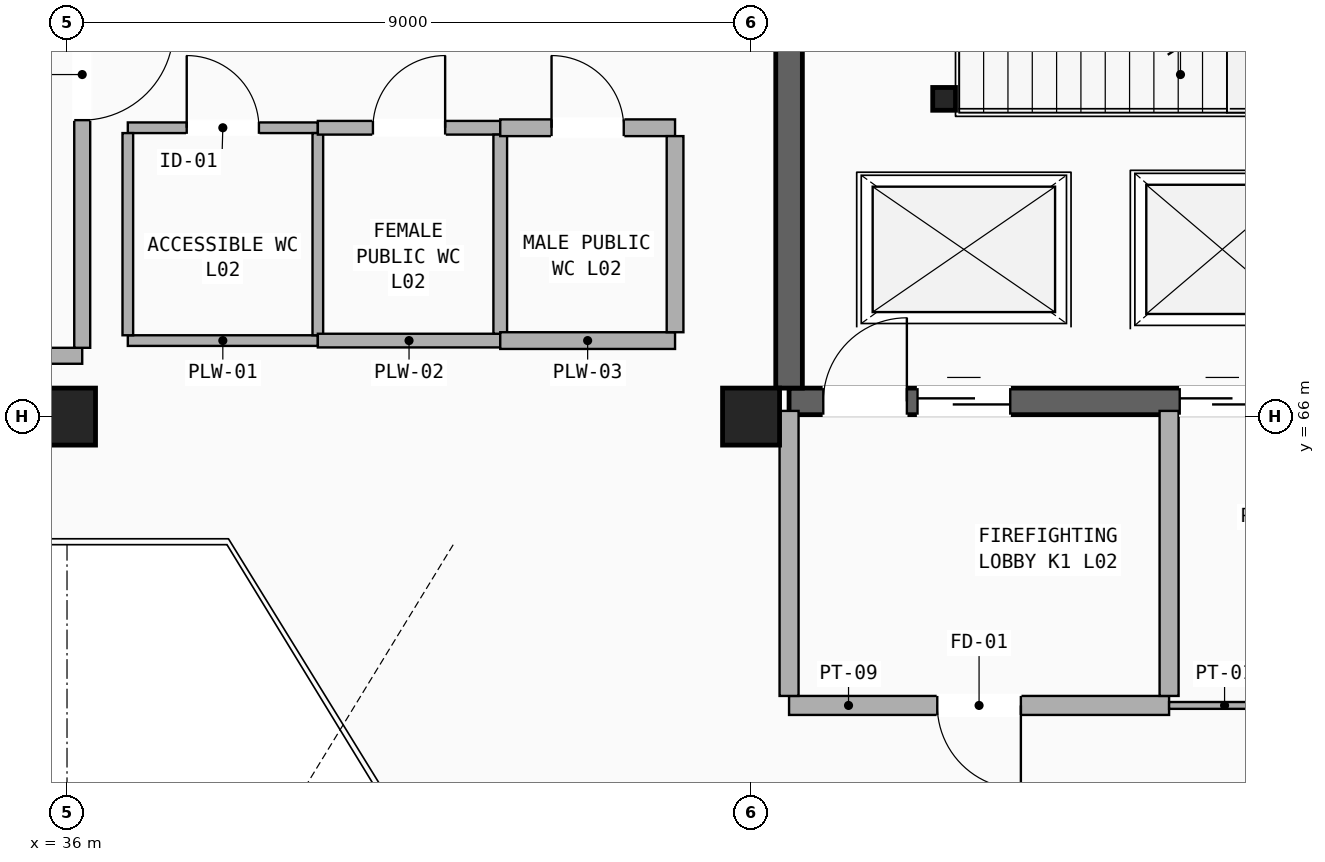
"""IFC4 building model, lengths in metres.
Left out: names, types, materials, properties, quantities, classifications, styles, units other than length and angle.
Written with IfcOpenShell. Run it as: python <this file> out.ifc"""

import sys

from ifc_helpers import new_model, si_unit, direction, frame, frame_2d, origin, origin_2d, place, context, subcontext, project, spatial, rectangle, hollow_rectangle, extrude, element, fill, save


model = new_model("IFC4")
c1 = context("Model", 3, precision=1e-05, world=origin(), true_north=direction((0.0, 1.0)))
c2 = subcontext(c1, "Body", "Model", "MODEL_VIEW")
j1 = project(units=[si_unit("LENGTHUNIT", "METRE"), si_unit("PLANEANGLEUNIT", "RADIAN")], contexts=[c1])
p1 = place(None, origin())
s1 = spatial("IfcSite", under=j1, at=p1, CompositionType="ELEMENT")
p2 = place(p1, origin())
s2 = spatial("IfcBuilding", under=s1, at=p2, CompositionType="ELEMENT")
p3 = place(p2, frame((0.0, 0.0, 9.52)))
s3 = spatial("IfcBuildingStorey", under=s2, at=p3, CompositionType="ELEMENT", Elevation=9.52)
for number, where, z_axis, x_axis in (
    (1, (36.0, 66.0, 0.0), (0.0, 0.0, 1.0), (1.0, 0.0, 0.0)),
    (2, (45.0, 66.0, 0.0), (0.0, 0.0, 1.0), (1.0, 0.0, 0.0)),
):
    element("IfcColumn", number, at=place(p3, frame(where, z_axis=z_axis, x_axis=x_axis)), inside=s3, PredefinedType="COLUMN", context=c2, shape_type="SweptSolid", body=[
        extrude(rectangle(XDim=0.75, YDim=0.75, at=origin_2d()), origin(), (0.0, 0.0, 1.0), 4.08),
    ])
p4 = place(p3, frame((45.5, 66.2, 0.0), z_axis=(0.0, 0.0, 1.0), x_axis=(1.0, 0.0, 0.0)))
e3 = element("IfcWall", 3, at=p4, inside=s3, PredefinedType="SHEAR", context=c2, shape_type="SweptSolid", body=[
    extrude(rectangle(XDim=10.3, YDim=0.35, at=frame_2d((5.15, 0.0))), origin(), (0.0, 0.0, 1.0), 4.08),
])
p5 = place(p4, frame((0.45, 0.0, 0.0)))
e4 = element("IfcOpeningElement", 4, at=p5, cuts=e3, PredefinedType="OPENING", context=c2, shape_type="SweptSolid", body=[
    extrude(rectangle(XDim=1.1, YDim=2.2, at=frame_2d((0.55, 1.1))), frame((0.0, 0.185, 0.0), z_axis=(0.0, -1.0, 0.0), x_axis=(1.0, 0.0, 0.0)), (0.0, 0.0, 1.0), 0.37),
])
p6 = place(p4, frame((1.69, 0.0, 0.0)))
e5 = element("IfcOpeningElement", 5, at=p6, cuts=e3, PredefinedType="OPENING", context=c2, shape_type="SweptSolid", body=[
    extrude(rectangle(XDim=1.22, YDim=2.2, at=frame_2d((0.61, 1.1))), frame((0.0, 0.185, 0.0), z_axis=(0.0, -1.0, 0.0), x_axis=(1.0, 0.0, 0.0)), (0.0, 0.0, 1.0), 0.37),
])
p7 = place(p4, frame((5.14, 0.0, 0.0)))
e6 = element("IfcOpeningElement", 6, at=p7, cuts=e3, PredefinedType="OPENING", context=c2, shape_type="SweptSolid", body=[
    extrude(rectangle(XDim=1.12, YDim=2.16, at=frame_2d((0.56, 1.08))), frame((0.0, 0.185, 0.0), z_axis=(0.0, -1.0, 0.0), x_axis=(1.0, 0.0, 0.0)), (0.0, 0.0, 1.0), 0.37),
])
p8 = place(p3, frame((45.5, 66.375, 0.0), z_axis=(0.0, 0.0, 1.0), x_axis=(0.0, 1.0, 0.0)))
e7 = element("IfcWall", 7, at=p8, inside=s3, PredefinedType="SHEAR", context=c2, shape_type="SweptSolid", body=[
    extrude(rectangle(XDim=8.25, YDim=0.35, at=frame_2d((4.125, 0.0))), origin(), (0.0, 0.0, 1.0), 4.08),
])
p9 = place(p3, frame((47.54, 70.18, 0.0), z_axis=(0.0, 0.0, 1.0), x_axis=(1.0, 0.0, 0.0)))
e8 = element("IfcColumn", 8, at=p9, inside=s3, PredefinedType="COLUMN", context=c2, shape_type="SweptSolid", body=[
    extrude(hollow_rectangle(XDim=0.3, YDim=0.3, WallThickness=0.016, InnerFilletRadius=0.016, OuterFilletRadius=0.032, at=origin_2d()), origin(), (0.0, 0.0, 1.0), 4.08),
])
p10 = place(p3, frame((45.5, 62.2, 0.0), z_axis=(0.0, 0.0, 1.0), x_axis=(1.0, 0.0, 0.0)))
e9 = element("IfcWall", 9, at=p10, inside=s3, PredefinedType="PARTITIONING", context=c2, shape_type="SweptSolid", body=[
    extrude(rectangle(XDim=5.0, YDim=0.25, at=frame_2d((2.5, 0.0))), origin(), (0.0, 0.0, 1.0), 3.84),
])
p11 = place(p10, frame((1.95, 0.0, 0.0)))
e10 = element("IfcOpeningElement", 10, at=p11, cuts=e9, PredefinedType="OPENING", context=c2, shape_type="SweptSolid", body=[
    extrude(rectangle(XDim=1.1, YDim=2.2, at=frame_2d((0.55, 1.1))), frame((0.0, 0.135, 0.0), z_axis=(0.0, -1.0, 0.0), x_axis=(1.0, 0.0, 0.0)), (0.0, 0.0, 1.0), 0.27),
])
for number, where, z_axis, x_axis in (
    (11, (45.5, 62.325, 0.0), (0.0, 0.0, 1.0), (0.0, 1.0, 0.0)),
    (12, (50.5, 62.325, 0.0), (0.0, 0.0, 1.0), (0.0, 1.0, 0.0)),
):
    element("IfcWall", number, at=place(p3, frame(where, z_axis=z_axis, x_axis=x_axis)), inside=s3, PredefinedType="PARTITIONING", context=c2, shape_type="SweptSolid", body=[
        extrude(rectangle(XDim=3.75, YDim=0.25, at=frame_2d((1.875, 0.0))), origin(), (0.0, 0.0, 1.0), 2.82),
    ])
p12 = place(p3, frame((50.5, 62.2, 0.0), z_axis=(0.0, 0.0, 1.0), x_axis=(1.0, 0.0, 0.0)))
e13 = element("IfcWall", 13, at=p12, inside=s3, PredefinedType="PARTITIONING", context=c2, shape_type="SweptSolid", body=[
    extrude(rectangle(XDim=5.3, YDim=0.09, at=frame_2d((2.65, 0.0))), origin(), (0.0, 0.0, 1.0), 3.17),
])
p13 = place(p12, frame((1.95, 0.0, 0.0)))
e14 = element("IfcOpeningElement", 14, at=p13, cuts=e13, PredefinedType="OPENING", context=c2, shape_type="SweptSolid", body=[
    extrude(rectangle(XDim=1.4, YDim=2.2, at=frame_2d((0.7, 1.1))), frame((0.0, 0.055, 0.0), z_axis=(0.0, -1.0, 0.0), x_axis=(1.0, 0.0, 0.0)), (0.0, 0.0, 1.0), 0.11),
])
p14 = place(p3, frame((36.8, 67.0, 0.0), z_axis=(0.0, 0.0, 1.0), x_axis=(1.0, 0.0, 0.0)))
e15 = element("IfcWall", 15, at=p14, inside=s3, PredefinedType="PLUMBINGWALL", context=c2, shape_type="SweptSolid", body=[
    extrude(rectangle(XDim=2.5, YDim=0.14, at=frame_2d((1.25, 0.0))), origin(), (0.0, 0.0, 1.0), 3.84),
])
p15 = place(p3, frame((36.8, 69.8, 0.0), z_axis=(0.0, 0.0, 1.0), x_axis=(1.0, 0.0, 0.0)))
e16 = element("IfcWall", 16, at=p15, inside=s3, PredefinedType="PLUMBINGWALL", context=c2, shape_type="SweptSolid", body=[
    extrude(rectangle(XDim=2.5, YDim=0.14, at=frame_2d((1.25, 0.0))), origin(), (0.0, 0.0, 1.0), 3.84),
])
p16 = place(p15, frame((0.775, 0.0, 0.0)))
e17 = element("IfcOpeningElement", 17, at=p16, cuts=e16, PredefinedType="OPENING", context=c2, shape_type="SweptSolid", body=[
    extrude(rectangle(XDim=0.95, YDim=2.15, at=frame_2d((0.475, 1.075))), frame((0.0, 0.08, 0.0), z_axis=(0.0, -1.0, 0.0), x_axis=(1.0, 0.0, 0.0)), (0.0, 0.0, 1.0), 0.16),
])
for number, where, z_axis, x_axis in (
    (18, (36.8, 67.07, 0.0), (0.0, 0.0, 1.0), (0.0, 1.0, 0.0)),
    (19, (39.3, 67.07, 0.0), (0.0, 0.0, 1.0), (0.0, 1.0, 0.0)),
):
    element("IfcWall", number, at=place(p3, frame(where, z_axis=z_axis, x_axis=x_axis)), inside=s3, PredefinedType="PLUMBINGWALL", context=c2, shape_type="SweptSolid", body=[
        extrude(rectangle(XDim=2.66, YDim=0.14, at=frame_2d((1.33, 0.0))), origin(), (0.0, 0.0, 1.0), 3.84),
    ])
p17 = place(p3, frame((39.3, 67.0, 0.0), z_axis=(0.0, 0.0, 1.0), x_axis=(1.0, 0.0, 0.0)))
e20 = element("IfcWall", 20, at=p17, inside=s3, PredefinedType="PLUMBINGWALL", context=c2, shape_type="SweptSolid", body=[
    extrude(rectangle(XDim=2.4, YDim=0.18, at=frame_2d((1.2, 0.0))), origin(), (0.0, 0.0, 1.0), 3.84),
])
p18 = place(p3, frame((39.3, 69.8, 0.0), z_axis=(0.0, 0.0, 1.0), x_axis=(1.0, 0.0, 0.0)))
e21 = element("IfcWall", 21, at=p18, inside=s3, PredefinedType="PLUMBINGWALL", context=c2, shape_type="SweptSolid", body=[
    extrude(rectangle(XDim=2.4, YDim=0.18, at=frame_2d((1.2, 0.0))), origin(), (0.0, 0.0, 1.0), 3.84),
])
p19 = place(p18, frame((0.725, 0.0, 0.0)))
e22 = element("IfcOpeningElement", 22, at=p19, cuts=e21, PredefinedType="OPENING", context=c2, shape_type="SweptSolid", body=[
    extrude(rectangle(XDim=0.95, YDim=2.15, at=frame_2d((0.475, 1.075))), frame((0.0, 0.1, 0.0), z_axis=(0.0, -1.0, 0.0), x_axis=(1.0, 0.0, 0.0)), (0.0, 0.0, 1.0), 0.2),
])
p20 = place(p3, frame((41.7, 67.09, 0.0), z_axis=(0.0, 0.0, 1.0), x_axis=(0.0, 1.0, 0.0)))
e23 = element("IfcWall", 23, at=p20, inside=s3, PredefinedType="PLUMBINGWALL", context=c2, shape_type="SweptSolid", body=[
    extrude(rectangle(XDim=2.62, YDim=0.18, at=frame_2d((1.31, 0.0))), origin(), (0.0, 0.0, 1.0), 3.84),
])
p21 = place(p3, frame((41.7, 67.0, 0.0), z_axis=(0.0, 0.0, 1.0), x_axis=(1.0, 0.0, 0.0)))
e24 = element("IfcWall", 24, at=p21, inside=s3, PredefinedType="PLUMBINGWALL", context=c2, shape_type="SweptSolid", body=[
    extrude(rectangle(XDim=2.3, YDim=0.22, at=frame_2d((1.15, 0.0))), origin(), (0.0, 0.0, 1.0), 3.84),
])
p22 = place(p3, frame((41.7, 69.8, 0.0), z_axis=(0.0, 0.0, 1.0), x_axis=(1.0, 0.0, 0.0)))
e25 = element("IfcWall", 25, at=p22, inside=s3, PredefinedType="PLUMBINGWALL", context=c2, shape_type="SweptSolid", body=[
    extrude(rectangle(XDim=2.3, YDim=0.22, at=frame_2d((1.15, 0.0))), origin(), (0.0, 0.0, 1.0), 3.84),
])
p23 = place(p22, frame((0.675, 0.0, 0.0)))
e26 = element("IfcOpeningElement", 26, at=p23, cuts=e25, PredefinedType="OPENING", context=c2, shape_type="SweptSolid", body=[
    extrude(rectangle(XDim=0.95, YDim=2.15, at=frame_2d((0.475, 1.075))), frame((0.0, 0.12, 0.0), z_axis=(0.0, -1.0, 0.0), x_axis=(1.0, 0.0, 0.0)), (0.0, 0.0, 1.0), 0.24),
])
p24 = place(p3, frame((44.0, 67.11, 0.0), z_axis=(0.0, 0.0, 1.0), x_axis=(0.0, 1.0, 0.0)))
e27 = element("IfcWall", 27, at=p24, inside=s3, PredefinedType="PLUMBINGWALL", context=c2, shape_type="SweptSolid", body=[
    extrude(rectangle(XDim=2.58, YDim=0.22, at=frame_2d((1.29, 0.0))), origin(), (0.0, 0.0, 1.0), 3.84),
])
p25 = place(p3, frame((27.6, 66.8, 0.0), z_axis=(0.0, 0.0, 1.0), x_axis=(1.0, 0.0, 0.0)))
e28 = element("IfcWall", 28, at=p25, inside=s3, PredefinedType="PARTITIONING", context=c2, shape_type="SweptSolid", body=[
    extrude(rectangle(XDim=8.6, YDim=0.21, at=frame_2d((4.3, 0.0))), origin(), (0.0, 0.0, 1.0), 3.17),
])
p26 = place(p3, frame((36.2, 66.905, 0.0), z_axis=(0.0, 0.0, 1.0), x_axis=(0.0, 1.0, 0.0)))
e29 = element("IfcWall", 29, at=p26, inside=s3, PredefinedType="PARTITIONING", context=c2, shape_type="SweptSolid", body=[
    extrude(rectangle(XDim=7.19, YDim=0.21, at=frame_2d((3.595, 0.0))), origin(), (0.0, 0.0, 1.0), 3.17),
])
p27 = place(p26, frame((2.995, 0.0, 0.0)))
e30 = element("IfcOpeningElement", 30, at=p27, cuts=e29, PredefinedType="OPENING", context=c2, shape_type="SweptSolid", body=[
    extrude(rectangle(XDim=1.2, YDim=2.2, at=frame_2d((0.6, 1.1))), frame((0.0, 0.115, 0.0), z_axis=(0.0, -1.0, 0.0), x_axis=(1.0, 0.0, 0.0)), (0.0, 0.0, 1.0), 0.23),
])
p28 = place(p5, origin())
e31 = element("IfcDoor", 31, at=p28, inside=s3, OperationType="SINGLE_SWING_RIGHT", PredefinedType="DOOR", context=c2, shape_type="SweptSolid", body=[
    extrude(rectangle(XDim=1.1, YDim=2.2, at=frame_2d((0.55, 1.1))), frame((0.0, 0.025, 0.0), z_axis=(0.0, -1.0, 0.0), x_axis=(1.0, 0.0, 0.0)), (0.0, 0.0, 1.0), 0.05),
])
fill(e4, e31)
p29 = place(p6, origin())
e32 = element("IfcDoor", 32, at=p29, inside=s3, OperationType="SLIDING_TO_LEFT", PredefinedType="DOOR", context=c2, shape_type="SweptSolid", body=[
    extrude(rectangle(XDim=1.22, YDim=2.2, at=frame_2d((0.61, 1.1))), frame((0.0, 0.025, 0.0), z_axis=(0.0, -1.0, 0.0), x_axis=(1.0, 0.0, 0.0)), (0.0, 0.0, 1.0), 0.05),
])
fill(e5, e32)
p30 = place(p7, origin())
e33 = element("IfcDoor", 33, at=p30, inside=s3, OperationType="SLIDING_TO_LEFT", PredefinedType="DOOR", context=c2, shape_type="SweptSolid", body=[
    extrude(rectangle(XDim=1.12, YDim=2.16, at=frame_2d((0.56, 1.08))), frame((0.0, 0.025, 0.0), z_axis=(0.0, -1.0, 0.0), x_axis=(1.0, 0.0, 0.0)), (0.0, 0.0, 1.0), 0.05),
])
fill(e6, e33)
p31 = place(p11, frame((1.1, 0.0, 0.0), z_axis=(0.0, 0.0, 1.0), x_axis=(-1.0, 0.0, 0.0)))
e34 = element("IfcDoor", 34, at=p31, inside=s3, OperationType="SINGLE_SWING_LEFT", PredefinedType="DOOR", context=c2, shape_type="SweptSolid", body=[
    extrude(rectangle(XDim=1.1, YDim=2.2, at=frame_2d((0.55, 1.1))), frame((0.0, 0.025, 0.0), z_axis=(0.0, -1.0, 0.0), x_axis=(1.0, 0.0, 0.0)), (0.0, 0.0, 1.0), 0.05),
])
fill(e10, e34)
p32 = place(p16, origin())
e35 = element("IfcDoor", 35, at=p32, inside=s3, OperationType="SINGLE_SWING_LEFT", PredefinedType="DOOR", context=c2, shape_type="SweptSolid", body=[
    extrude(rectangle(XDim=0.95, YDim=2.15, at=frame_2d((0.475, 1.075))), frame((0.0, 0.025, 0.0), z_axis=(0.0, -1.0, 0.0), x_axis=(1.0, 0.0, 0.0)), (0.0, 0.0, 1.0), 0.05),
])
fill(e17, e35)
p33 = place(p19, origin())
e36 = element("IfcDoor", 36, at=p33, inside=s3, OperationType="SINGLE_SWING_RIGHT", PredefinedType="DOOR", context=c2, shape_type="SweptSolid", body=[
    extrude(rectangle(XDim=0.95, YDim=2.15, at=frame_2d((0.475, 1.075))), frame((0.0, 0.025, 0.0), z_axis=(0.0, -1.0, 0.0), x_axis=(1.0, 0.0, 0.0)), (0.0, 0.0, 1.0), 0.05),
])
fill(e22, e36)
p34 = place(p23, origin())
e37 = element("IfcDoor", 37, at=p34, inside=s3, OperationType="SINGLE_SWING_LEFT", PredefinedType="DOOR", context=c2, shape_type="SweptSolid", body=[
    extrude(rectangle(XDim=0.95, YDim=2.15, at=frame_2d((0.475, 1.075))), frame((0.0, 0.025, 0.0), z_axis=(0.0, -1.0, 0.0), x_axis=(1.0, 0.0, 0.0)), (0.0, 0.0, 1.0), 0.05),
])
fill(e26, e37)
p35 = place(p27, frame((1.2, 0.0, 0.0), z_axis=(0.0, 0.0, 1.0), x_axis=(-1.0, 0.0, 0.0)))
e38 = element("IfcDoor", 38, at=p35, inside=s3, OperationType="SINGLE_SWING_LEFT", PredefinedType="DOOR", context=c2, shape_type="SweptSolid", body=[
    extrude(rectangle(XDim=1.2, YDim=2.2, at=frame_2d((0.6, 1.1))), frame((0.0, 0.025, 0.0), z_axis=(0.0, -1.0, 0.0), x_axis=(1.0, 0.0, 0.0)), (0.0, 0.0, 1.0), 0.05),
])
fill(e30, e38)
save(model, sys.argv[1])
